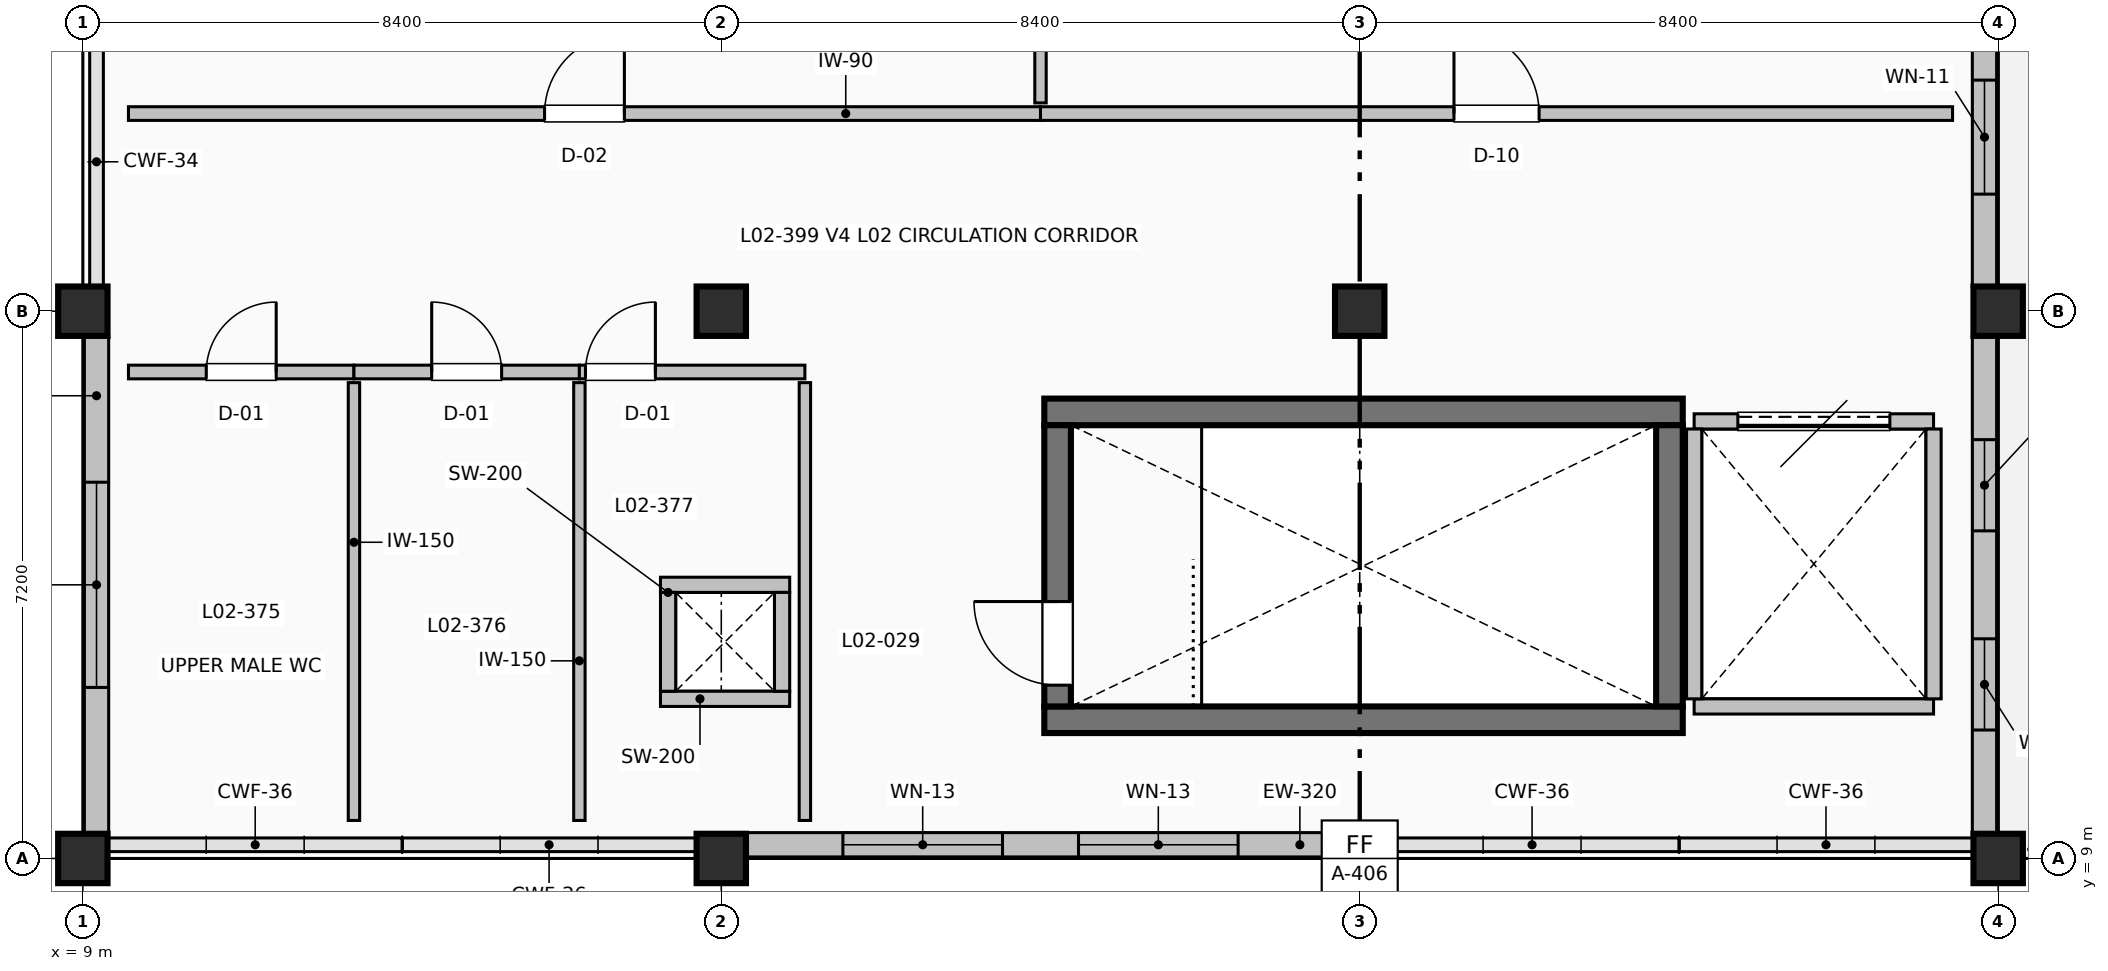
"""IFC4 building model, lengths in metres.
Left out: names, types, materials, properties, quantities, classifications, styles, units other than length and angle.
Written with IfcOpenShell. Run it as: python <this file> out.ifc"""

import sys

from ifc_helpers import new_model, si_unit, direction, frame, frame_2d, origin, origin_2d, place, context, subcontext, project, spatial, rectangle, extrude, element, fill, save


model = new_model("IFC4")
c1 = context("Model", 3, precision=1e-05, world=origin(), true_north=direction((0.0, 1.0)))
c2 = subcontext(c1, "Body", "Model", "MODEL_VIEW")
j1 = project(units=[si_unit("LENGTHUNIT", "METRE"), si_unit("PLANEANGLEUNIT", "RADIAN")], contexts=[c1])
p1 = place(None, origin())
s1 = spatial("IfcSite", under=j1, at=p1, CompositionType="ELEMENT")
p2 = place(p1, origin())
s2 = spatial("IfcBuilding", under=s1, at=p2, CompositionType="ELEMENT")
p3 = place(p2, frame((0.0, 0.0, 10.2)))
s3 = spatial("IfcBuildingStorey", under=s2, at=p3, CompositionType="ELEMENT", Elevation=10.2)
for number, where, z_axis, x_axis in (
    (1, (9.0, 9.0, 0.0), (0.0, 0.0, 1.0), (1.0, 0.0, 0.0)),
    (2, (9.0, 16.2, 0.0), (0.0, 0.0, 1.0), (1.0, 0.0, 0.0)),
    (3, (17.4, 9.0, 0.0), (0.0, 0.0, 1.0), (1.0, 0.0, 0.0)),
    (4, (17.4, 16.2, 0.0), (0.0, 0.0, 1.0), (1.0, 0.0, 0.0)),
    (5, (25.8, 9.0, 0.0), (0.0, 0.0, 1.0), (1.0, 0.0, 0.0)),
    (6, (25.8, 16.2, 0.0), (0.0, 0.0, 1.0), (1.0, 0.0, 0.0)),
    (7, (34.2, 9.0, 0.0), (0.0, 0.0, 1.0), (1.0, 0.0, 0.0)),
    (8, (34.2, 16.2, 0.0), (0.0, 0.0, 1.0), (1.0, 0.0, 0.0)),
):
    element("IfcColumn", number, at=place(p3, frame(where, z_axis=z_axis, x_axis=x_axis)), inside=s3, PredefinedType="COLUMN", context=c2, shape_type="SweptSolid", body=[
        extrude(rectangle(XDim=0.65, YDim=0.65, at=origin_2d()), origin(), (0.0, 0.0, 1.0), 4.8),
    ])
for number, where, z_axis, x_axis in (
    (9, (21.65, 10.825, 0.0), (0.0, 0.0, 1.0), (1.0, 0.0, 0.0)),
    (10, (30.05, 14.875, 0.0), (0.0, 0.0, 1.0), (-1.0, 0.0, 0.0)),
):
    element("IfcWall", number, at=place(p3, frame(where, z_axis=z_axis, x_axis=x_axis)), inside=s3, PredefinedType="SHEAR", context=c2, shape_type="SweptSolid", body=[
        extrude(rectangle(XDim=8.4, YDim=0.35, at=frame_2d((4.2, 0.0))), origin(), (0.0, 0.0, 1.0), 4.58),
    ])
p4 = place(p3, frame((21.825, 11.0, 0.0), z_axis=(0.0, 0.0, 1.0), x_axis=(0.0, 1.0, 0.0)))
e11 = element("IfcWall", 11, at=p4, inside=s3, PredefinedType="SHEAR", context=c2, shape_type="SweptSolid", body=[
    extrude(rectangle(XDim=3.7, YDim=0.35, at=frame_2d((1.85, 0.0))), origin(), (0.0, 0.0, 1.0), 4.58),
])
p5 = place(p4, frame((0.28, 0.0, 0.0)))
e12 = element("IfcOpeningElement", 12, at=p5, cuts=e11, PredefinedType="OPENING", context=c2, shape_type="SweptSolid", body=[
    extrude(rectangle(XDim=1.1, YDim=2.08, at=frame_2d((0.55, 1.04))), frame((0.0, 0.185, 0.0), z_axis=(0.0, -1.0, 0.0), x_axis=(1.0, 0.0, 0.0)), (0.0, 0.0, 1.0), 0.37),
])
p6 = place(p3, frame((29.875, 14.7, 0.0), z_axis=(0.0, 0.0, 1.0), x_axis=(0.0, -1.0, 0.0)))
e13 = element("IfcWall", 13, at=p6, inside=s3, PredefinedType="SHEAR", context=c2, shape_type="SweptSolid", body=[
    extrude(rectangle(XDim=3.7, YDim=0.35, at=frame_2d((1.85, 0.0))), origin(), (0.0, 0.0, 1.0), 4.58),
])
p7 = place(p3, frame((34.02, 23.075, 0.0), z_axis=(0.0, 0.0, 1.0), x_axis=(0.0, -1.0, 0.0)))
e14 = element("IfcWall", 14, at=p7, inside=s3, PredefinedType="SOLIDWALL", context=c2, shape_type="SweptSolid", body=[
    extrude(rectangle(XDim=6.55, YDim=0.32, at=frame_2d((3.275, 0.0))), origin(), (0.0, 0.0, 1.0), 3.822),
])
p8 = place(p7, frame((1.215, 0.0, 0.95)))
e15 = element("IfcOpeningElement", 15, at=p8, cuts=e14, PredefinedType="OPENING", context=c2, shape_type="SweptSolid", body=[
    extrude(rectangle(XDim=1.5, YDim=1.9, at=frame_2d((0.75, 0.95))), frame((0.0, 0.17, 0.0), z_axis=(0.0, -1.0, 0.0), x_axis=(1.0, 0.0, 0.0)), (0.0, 0.0, 1.0), 0.34),
])
p9 = place(p7, frame((3.835, 0.0, 0.95)))
e16 = element("IfcOpeningElement", 16, at=p9, cuts=e14, PredefinedType="OPENING", context=c2, shape_type="SweptSolid", body=[
    extrude(rectangle(XDim=1.5, YDim=1.9, at=frame_2d((0.75, 0.95))), frame((0.0, 0.17, 0.0), z_axis=(0.0, -1.0, 0.0), x_axis=(1.0, 0.0, 0.0)), (0.0, 0.0, 1.0), 0.34),
])
p10 = place(p3, frame((34.02, 15.875, 0.0), z_axis=(0.0, 0.0, 1.0), x_axis=(0.0, -1.0, 0.0)))
e17 = element("IfcWall", 17, at=p10, inside=s3, PredefinedType="SOLIDWALL", context=c2, shape_type="SweptSolid", body=[
    extrude(rectangle(XDim=6.55, YDim=0.32, at=frame_2d((3.275, 0.0))), origin(), (0.0, 0.0, 1.0), 3.822),
])
p11 = place(p10, frame((1.365, 0.0, 0.95)))
e18 = element("IfcOpeningElement", 18, at=p11, cuts=e17, PredefinedType="OPENING", context=c2, shape_type="SweptSolid", body=[
    extrude(rectangle(XDim=1.2, YDim=1.9, at=frame_2d((0.6, 0.95))), frame((0.0, 0.17, 0.0), z_axis=(0.0, -1.0, 0.0), x_axis=(1.0, 0.0, 0.0)), (0.0, 0.0, 1.0), 0.34),
])
p12 = place(p10, frame((3.985, 0.0, 0.95)))
e19 = element("IfcOpeningElement", 19, at=p12, cuts=e17, PredefinedType="OPENING", context=c2, shape_type="SweptSolid", body=[
    extrude(rectangle(XDim=1.2, YDim=1.9, at=frame_2d((0.6, 0.95))), frame((0.0, 0.17, 0.0), z_axis=(0.0, -1.0, 0.0), x_axis=(1.0, 0.0, 0.0)), (0.0, 0.0, 1.0), 0.34),
])
p13 = place(p3, frame((9.18, 9.325, 0.0), z_axis=(0.0, 0.0, 1.0), x_axis=(0.0, 1.0, 0.0)))
e20 = element("IfcWall", 20, at=p13, inside=s3, PredefinedType="SOLIDWALL", context=c2, shape_type="SweptSolid", body=[
    extrude(rectangle(XDim=6.55, YDim=0.32, at=frame_2d((3.275, 0.0))), origin(), (0.0, 0.0, 1.0), 3.822),
])
p14 = place(p13, frame((1.925, 0.0, 0.95)))
e21 = element("IfcOpeningElement", 21, at=p14, cuts=e20, PredefinedType="OPENING", context=c2, shape_type="SweptSolid", body=[
    extrude(rectangle(XDim=2.7, YDim=1.9, at=frame_2d((1.35, 0.95))), frame((0.0, 0.17, 0.0), z_axis=(0.0, -1.0, 0.0), x_axis=(1.0, 0.0, 0.0)), (0.0, 0.0, 1.0), 0.34),
])
p15 = place(p3, frame((25.475, 9.18, 0.0), z_axis=(0.0, 0.0, 1.0), x_axis=(-1.0, 0.0, 0.0)))
e22 = element("IfcWall", 22, at=p15, inside=s3, PredefinedType="SOLIDWALL", context=c2, shape_type="SweptSolid", body=[
    extrude(rectangle(XDim=7.75, YDim=0.32, at=frame_2d((3.875, 0.0))), origin(), (0.0, 0.0, 1.0), 3.672),
])
p16 = place(p15, frame((1.275, 0.0, 0.95)))
e23 = element("IfcOpeningElement", 23, at=p16, cuts=e22, PredefinedType="OPENING", context=c2, shape_type="SweptSolid", body=[
    extrude(rectangle(XDim=2.1, YDim=1.9, at=frame_2d((1.05, 0.95))), frame((0.0, 0.17, 0.0), z_axis=(0.0, -1.0, 0.0), x_axis=(1.0, 0.0, 0.0)), (0.0, 0.0, 1.0), 0.34),
])
p17 = place(p15, frame((4.375, 0.0, 0.95)))
e24 = element("IfcOpeningElement", 24, at=p17, cuts=e22, PredefinedType="OPENING", context=c2, shape_type="SweptSolid", body=[
    extrude(rectangle(XDim=2.1, YDim=1.9, at=frame_2d((1.05, 0.95))), frame((0.0, 0.17, 0.0), z_axis=(0.0, -1.0, 0.0), x_axis=(1.0, 0.0, 0.0)), (0.0, 0.0, 1.0), 0.34),
])
p18 = place(p3, frame((16.6, 11.1, 0.0), z_axis=(0.0, 0.0, 1.0), x_axis=(1.0, 0.0, 0.0)))
e25 = element("IfcWall", 25, at=p18, inside=s3, PredefinedType="PARTITIONING", context=c2, shape_type="SweptSolid", body=[
    extrude(rectangle(XDim=1.7, YDim=0.2, at=frame_2d((0.85, 0.0))), origin(), (0.0, 0.0, 1.0), 4.5),
])
p19 = place(p3, frame((18.3, 12.6, 0.0), z_axis=(0.0, 0.0, 1.0), x_axis=(-1.0, 0.0, 0.0)))
e26 = element("IfcWall", 26, at=p19, inside=s3, PredefinedType="PARTITIONING", context=c2, shape_type="SweptSolid", body=[
    extrude(rectangle(XDim=1.7, YDim=0.2, at=frame_2d((0.85, 0.0))), origin(), (0.0, 0.0, 1.0), 4.212),
])
for number, where, z_axis, x_axis in (
    (27, (16.7, 11.2, 0.0), (0.0, 0.0, 1.0), (0.0, 1.0, 0.0)),
    (28, (18.2, 12.5, 0.0), (0.0, 0.0, 1.0), (0.0, -1.0, 0.0)),
):
    element("IfcWall", number, at=place(p3, frame(where, z_axis=z_axis, x_axis=x_axis)), inside=s3, PredefinedType="PARTITIONING", context=c2, shape_type="SweptSolid", body=[
        extrude(rectangle(XDim=1.3, YDim=0.2, at=frame_2d((0.65, 0.0))), origin(), (0.0, 0.0, 1.0), 4.5),
    ])
p20 = place(p3, frame((30.2, 11.0, 0.0), z_axis=(0.0, 0.0, 1.0), x_axis=(1.0, 0.0, 0.0)))
e29 = element("IfcWall", 29, at=p20, inside=s3, PredefinedType="PARTITIONING", context=c2, shape_type="SweptSolid", body=[
    extrude(rectangle(XDim=3.15, YDim=0.2, at=frame_2d((1.575, 0.0))), origin(), (0.0, 0.0, 1.0), 4.492),
])
p21 = place(p3, frame((33.35, 14.75, 0.0), z_axis=(0.0, 0.0, 1.0), x_axis=(-1.0, 0.0, 0.0)))
e30 = element("IfcWall", 30, at=p21, inside=s3, PredefinedType="PARTITIONING", context=c2, shape_type="SweptSolid", body=[
    extrude(rectangle(XDim=3.15, YDim=0.2, at=frame_2d((1.575, 0.0))), origin(), (0.0, 0.0, 1.0), 4.492),
])
p22 = place(p21, frame((0.575, 0.0, 0.0)))
e31 = element("IfcOpeningElement", 31, at=p22, cuts=e30, PredefinedType="OPENING", context=c2, shape_type="SweptSolid", body=[
    extrude(rectangle(XDim=2.0, YDim=2.35, at=frame_2d((1.0, 1.175))), frame((0.0, 0.11, 0.0), z_axis=(0.0, -1.0, 0.0), x_axis=(1.0, 0.0, 0.0)), (0.0, 0.0, 1.0), 0.22),
])
for number, where, z_axis, x_axis in (
    (32, (30.2, 11.1, 0.0), (0.0, 0.0, 1.0), (0.0, 1.0, 0.0)),
    (33, (33.35, 14.65, 0.0), (0.0, 0.0, 1.0), (0.0, -1.0, 0.0)),
):
    element("IfcWall", number, at=place(p3, frame(where, z_axis=z_axis, x_axis=x_axis)), inside=s3, PredefinedType="PARTITIONING", context=c2, shape_type="SweptSolid", body=[
        extrude(rectangle(XDim=3.55, YDim=0.2, at=frame_2d((1.775, 0.0))), origin(), (0.0, 0.0, 1.0), 4.492),
    ])
p23 = place(p3, frame((9.6, 18.8, 0.0), z_axis=(0.0, 0.0, 1.0), x_axis=(1.0, 0.0, 0.0)))
e34 = element("IfcWall", 34, at=p23, inside=s3, PredefinedType="PARTITIONING", context=c2, shape_type="SweptSolid", body=[
    extrude(rectangle(XDim=12.0, YDim=0.18, at=frame_2d((6.0, 0.0))), origin(), (0.0, 0.0, 1.0), 4.492),
])
p24 = place(p23, frame((5.475, 0.0, 0.0)))
e35 = element("IfcOpeningElement", 35, at=p24, cuts=e34, PredefinedType="OPENING", context=c2, shape_type="SweptSolid", body=[
    extrude(rectangle(XDim=1.05, YDim=2.1, at=frame_2d((0.525, 1.05))), frame((0.0, 0.1, 0.0), z_axis=(0.0, -1.0, 0.0), x_axis=(1.0, 0.0, 0.0)), (0.0, 0.0, 1.0), 0.2),
])
p25 = place(p3, frame((21.6, 18.94, 0.0), z_axis=(0.0, 0.0, 1.0), x_axis=(0.0, 1.0, 0.0)))
e36 = element("IfcWall", 36, at=p25, inside=s3, PredefinedType="PARTITIONING", context=c2, shape_type="SweptSolid", body=[
    extrude(rectangle(XDim=18.26, YDim=0.15, at=frame_2d((9.13, 0.0))), origin(), (0.0, 0.0, 1.0), 4.492),
])
p26 = place(p3, frame((21.6, 18.8, 0.0), z_axis=(0.0, 0.0, 1.0), x_axis=(1.0, 0.0, 0.0)))
e37 = element("IfcWall", 37, at=p26, inside=s3, PredefinedType="PARTITIONING", context=c2, shape_type="SweptSolid", body=[
    extrude(rectangle(XDim=12.0, YDim=0.18, at=frame_2d((6.0, 0.0))), origin(), (0.0, 0.0, 1.0), 4.492),
])
p27 = place(p26, frame((5.44, 0.0, 0.0)))
e38 = element("IfcOpeningElement", 38, at=p27, cuts=e37, PredefinedType="OPENING", context=c2, shape_type="SweptSolid", body=[
    extrude(rectangle(XDim=1.12, YDim=2.12, at=frame_2d((0.56, 1.06))), frame((0.0, 0.1, 0.0), z_axis=(0.0, -1.0, 0.0), x_axis=(1.0, 0.0, 0.0)), (0.0, 0.0, 1.0), 0.2),
])
p28 = place(p3, frame((9.6, 15.4, 0.0), z_axis=(0.0, 0.0, 1.0), x_axis=(1.0, 0.0, 0.0)))
e39 = element("IfcWall", 39, at=p28, inside=s3, PredefinedType="PARTITIONING", context=c2, shape_type="SweptSolid", body=[
    extrude(rectangle(XDim=2.967, YDim=0.18, at=frame_2d((1.483, 0.0))), origin(), (0.0, 0.0, 1.0), 4.492),
])
p29 = place(p28, frame((1.024, 0.0, 0.0)))
e40 = element("IfcOpeningElement", 40, at=p29, cuts=e39, PredefinedType="OPENING", context=c2, shape_type="SweptSolid", body=[
    extrude(rectangle(XDim=0.92, YDim=2.05, at=frame_2d((0.46, 1.025))), frame((0.0, 0.1, 0.0), z_axis=(0.0, -1.0, 0.0), x_axis=(1.0, 0.0, 0.0)), (0.0, 0.0, 1.0), 0.2),
])
p30 = place(p3, frame((12.567, 9.5, 0.0), z_axis=(0.0, 0.0, 1.0), x_axis=(0.0, 1.0, 0.0)))
e41 = element("IfcWall", 41, at=p30, inside=s3, PredefinedType="PARTITIONING", context=c2, shape_type="SweptSolid", body=[
    extrude(rectangle(XDim=5.76, YDim=0.15, at=frame_2d((2.88, 0.0))), origin(), (0.0, 0.0, 1.0), 4.492),
])
p31 = place(p3, frame((12.567, 15.4, 0.0), z_axis=(0.0, 0.0, 1.0), x_axis=(1.0, 0.0, 0.0)))
e42 = element("IfcWall", 42, at=p31, inside=s3, PredefinedType="PARTITIONING", context=c2, shape_type="SweptSolid", body=[
    extrude(rectangle(XDim=2.966, YDim=0.18, at=frame_2d((1.483, 0.0))), origin(), (0.0, 0.0, 1.0), 4.492),
])
p32 = place(p31, frame((1.023, 0.0, 0.0)))
e43 = element("IfcOpeningElement", 43, at=p32, cuts=e42, PredefinedType="OPENING", context=c2, shape_type="SweptSolid", body=[
    extrude(rectangle(XDim=0.92, YDim=2.05, at=frame_2d((0.46, 1.025))), frame((0.0, 0.1, 0.0), z_axis=(0.0, -1.0, 0.0), x_axis=(1.0, 0.0, 0.0)), (0.0, 0.0, 1.0), 0.2),
])
for number, where, z_axis, x_axis in (
    (44, (15.533, 9.5, 0.0), (0.0, 0.0, 1.0), (0.0, 1.0, 0.0)),
    (45, (18.5, 9.5, 0.0), (0.0, 0.0, 1.0), (0.0, 1.0, 0.0)),
):
    element("IfcWall", number, at=place(p3, frame(where, z_axis=z_axis, x_axis=x_axis)), inside=s3, PredefinedType="PARTITIONING", context=c2, shape_type="SweptSolid", body=[
        extrude(rectangle(XDim=5.76, YDim=0.15, at=frame_2d((2.88, 0.0))), origin(), (0.0, 0.0, 1.0), 4.492),
    ])
p33 = place(p3, frame((15.533, 15.4, 0.0), z_axis=(0.0, 0.0, 1.0), x_axis=(1.0, 0.0, 0.0)))
e46 = element("IfcWall", 46, at=p33, inside=s3, PredefinedType="PARTITIONING", context=c2, shape_type="SweptSolid", body=[
    extrude(rectangle(XDim=2.967, YDim=0.18, at=frame_2d((1.483, 0.0))), origin(), (0.0, 0.0, 1.0), 4.492),
])
p34 = place(p33, frame((0.08, 0.0, 0.0)))
e47 = element("IfcOpeningElement", 47, at=p34, cuts=e46, PredefinedType="OPENING", context=c2, shape_type="SweptSolid", body=[
    extrude(rectangle(XDim=0.92, YDim=2.05, at=frame_2d((0.46, 1.025))), frame((0.0, 0.1, 0.0), z_axis=(0.0, -1.0, 0.0), x_axis=(1.0, 0.0, 0.0)), (0.0, 0.0, 1.0), 0.2),
])
p35 = place(p9, origin())
e48 = element("IfcWindow", 48, at=p35, inside=s3, PartitioningType="SINGLE_PANEL", PredefinedType="WINDOW", context=c2, shape_type="SweptSolid", body=[
    extrude(rectangle(XDim=1.5, YDim=1.9, at=frame_2d((0.75, 0.95))), frame((0.0, 0.03, 0.0), z_axis=(0.0, -1.0, 0.0), x_axis=(1.0, 0.0, 0.0)), (0.0, 0.0, 1.0), 0.06),
])
fill(e16, e48)
p36 = place(p11, origin())
e49 = element("IfcWindow", 49, at=p36, inside=s3, PartitioningType="SINGLE_PANEL", PredefinedType="WINDOW", context=c2, shape_type="SweptSolid", body=[
    extrude(rectangle(XDim=1.2, YDim=1.9, at=frame_2d((0.6, 0.95))), frame((0.0, 0.03, 0.0), z_axis=(0.0, -1.0, 0.0), x_axis=(1.0, 0.0, 0.0)), (0.0, 0.0, 1.0), 0.06),
])
fill(e18, e49)
p37 = place(p12, origin())
e50 = element("IfcWindow", 50, at=p37, inside=s3, PartitioningType="SINGLE_PANEL", PredefinedType="WINDOW", context=c2, shape_type="SweptSolid", body=[
    extrude(rectangle(XDim=1.2, YDim=1.9, at=frame_2d((0.6, 0.95))), frame((0.0, 0.03, 0.0), z_axis=(0.0, -1.0, 0.0), x_axis=(1.0, 0.0, 0.0)), (0.0, 0.0, 1.0), 0.06),
])
fill(e19, e50)
p38 = place(p14, origin())
e51 = element("IfcWindow", 51, at=p38, inside=s3, PartitioningType="SINGLE_PANEL", PredefinedType="WINDOW", context=c2, shape_type="SweptSolid", body=[
    extrude(rectangle(XDim=2.7, YDim=1.9, at=frame_2d((1.35, 0.95))), frame((0.0, 0.03, 0.0), z_axis=(0.0, -1.0, 0.0), x_axis=(1.0, 0.0, 0.0)), (0.0, 0.0, 1.0), 0.06),
])
fill(e21, e51)
p39 = place(p16, origin())
e52 = element("IfcWindow", 52, at=p39, inside=s3, PartitioningType="SINGLE_PANEL", PredefinedType="WINDOW", context=c2, shape_type="SweptSolid", body=[
    extrude(rectangle(XDim=2.1, YDim=1.9, at=frame_2d((1.05, 0.95))), frame((0.0, 0.03, 0.0), z_axis=(0.0, -1.0, 0.0), x_axis=(1.0, 0.0, 0.0)), (0.0, 0.0, 1.0), 0.06),
])
fill(e23, e52)
p40 = place(p17, origin())
e53 = element("IfcWindow", 53, at=p40, inside=s3, PartitioningType="SINGLE_PANEL", PredefinedType="WINDOW", context=c2, shape_type="SweptSolid", body=[
    extrude(rectangle(XDim=2.1, YDim=1.9, at=frame_2d((1.05, 0.95))), frame((0.0, 0.03, 0.0), z_axis=(0.0, -1.0, 0.0), x_axis=(1.0, 0.0, 0.0)), (0.0, 0.0, 1.0), 0.06),
])
fill(e24, e53)
p41 = place(p5, origin())
e54 = element("IfcDoor", 54, at=p41, inside=s3, OperationType="SINGLE_SWING_RIGHT", PredefinedType="DOOR", context=c2, shape_type="SweptSolid", body=[
    extrude(rectangle(XDim=1.1, YDim=2.08, at=frame_2d((0.55, 1.04))), frame((0.0, 0.025, 0.0), z_axis=(0.0, -1.0, 0.0), x_axis=(1.0, 0.0, 0.0)), (0.0, 0.0, 1.0), 0.05),
])
fill(e12, e54)
p42 = place(p22, origin())
e55 = element("IfcDoor", 55, at=p42, inside=s3, OperationType="SLIDING_TO_LEFT", PredefinedType="DOOR", context=c2, shape_type="SweptSolid", body=[
    extrude(rectangle(XDim=2.0, YDim=2.35, at=frame_2d((1.0, 1.175))), frame((0.0, 0.025, 0.0), z_axis=(0.0, -1.0, 0.0), x_axis=(1.0, 0.0, 0.0)), (0.0, 0.0, 1.0), 0.05),
])
fill(e31, e55)
p43 = place(p24, origin())
e56 = element("IfcDoor", 56, at=p43, inside=s3, OperationType="SINGLE_SWING_RIGHT", PredefinedType="DOOR", context=c2, shape_type="SweptSolid", body=[
    extrude(rectangle(XDim=1.05, YDim=2.1, at=frame_2d((0.525, 1.05))), frame((0.0, 0.025, 0.0), z_axis=(0.0, -1.0, 0.0), x_axis=(1.0, 0.0, 0.0)), (0.0, 0.0, 1.0), 0.05),
])
fill(e35, e56)
p44 = place(p27, origin())
e57 = element("IfcDoor", 57, at=p44, inside=s3, OperationType="SINGLE_SWING_LEFT", PredefinedType="DOOR", context=c2, shape_type="SweptSolid", body=[
    extrude(rectangle(XDim=1.12, YDim=2.12, at=frame_2d((0.56, 1.06))), frame((0.0, 0.025, 0.0), z_axis=(0.0, -1.0, 0.0), x_axis=(1.0, 0.0, 0.0)), (0.0, 0.0, 1.0), 0.05),
])
fill(e38, e57)
p45 = place(p29, origin())
e58 = element("IfcDoor", 58, at=p45, inside=s3, OperationType="SINGLE_SWING_RIGHT", PredefinedType="DOOR", context=c2, shape_type="SweptSolid", body=[
    extrude(rectangle(XDim=0.92, YDim=2.05, at=frame_2d((0.46, 1.025))), frame((0.0, 0.025, 0.0), z_axis=(0.0, -1.0, 0.0), x_axis=(1.0, 0.0, 0.0)), (0.0, 0.0, 1.0), 0.05),
])
fill(e40, e58)
p46 = place(p32, origin())
e59 = element("IfcDoor", 59, at=p46, inside=s3, OperationType="SINGLE_SWING_LEFT", PredefinedType="DOOR", context=c2, shape_type="SweptSolid", body=[
    extrude(rectangle(XDim=0.92, YDim=2.05, at=frame_2d((0.46, 1.025))), frame((0.0, 0.025, 0.0), z_axis=(0.0, -1.0, 0.0), x_axis=(1.0, 0.0, 0.0)), (0.0, 0.0, 1.0), 0.05),
])
fill(e43, e59)
p47 = place(p34, origin())
e60 = element("IfcDoor", 60, at=p47, inside=s3, OperationType="SINGLE_SWING_RIGHT", PredefinedType="DOOR", context=c2, shape_type="SweptSolid", body=[
    extrude(rectangle(XDim=0.92, YDim=2.05, at=frame_2d((0.46, 1.025))), frame((0.0, 0.025, 0.0), z_axis=(0.0, -1.0, 0.0), x_axis=(1.0, 0.0, 0.0)), (0.0, 0.0, 1.0), 0.05),
])
fill(e47, e60)
save(model, sys.argv[1])
